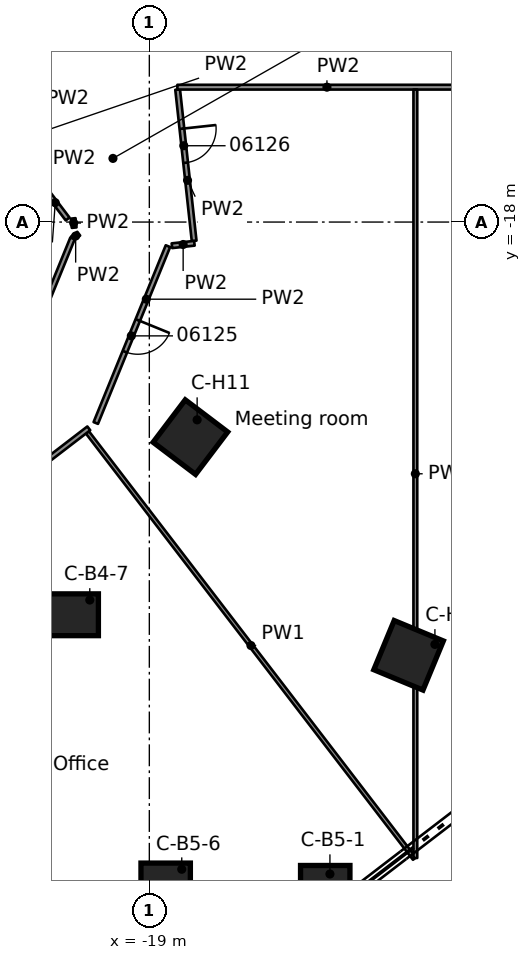
"""IFC4 building model, lengths in metres.
Left out: names, types, materials, properties, quantities, classifications, styles, units other than length and angle.
Written with IfcOpenShell. Run it as: python <this file> out.ifc"""

import sys

from ifc_helpers import new_model, si_unit, direction, frame, frame_2d, origin, origin_2d, place, context, subcontext, project, spatial, rectangle, extrude, element, fill, save


model = new_model("IFC4")
c1 = context("Model", 3, precision=1e-05, world=origin(), true_north=direction((0.0, 1.0)))
c2 = subcontext(c1, "Body", "Model", "MODEL_VIEW")
j1 = project(units=[si_unit("LENGTHUNIT", "METRE"), si_unit("PLANEANGLEUNIT", "RADIAN")], contexts=[c1])
p1 = place(None, origin())
s1 = spatial("IfcSite", under=j1, at=p1, CompositionType="ELEMENT")
p2 = place(p1, origin())
s2 = spatial("IfcBuilding", under=s1, at=p2, CompositionType="ELEMENT")
p3 = place(p2, frame((0.0, 0.0, 29.2)))
s3 = spatial("IfcBuildingStorey", under=s2, at=p3, CompositionType="ELEMENT", Elevation=29.2)
for number, where, z_axis, x_axis in (
    (1, (-20.99, -28.333, 0.0), (0.0, 0.0, 1.0), (1.0, 0.0, 0.0)),
    (2, (-14.371, -35.48, 0.0), (0.0, 0.0, 1.0), (1.0, 0.0, 0.0)),
    (3, (-18.57, -35.417, 0.0), (0.0, 0.0, 1.0), (1.0, 0.0, 0.0)),
):
    element("IfcColumn", number, at=place(p3, frame(where, z_axis=z_axis, x_axis=x_axis)), inside=s3, PredefinedType="COLUMN", context=c2, shape_type="SweptSolid", body=[
        extrude(rectangle(XDim=1.3, YDim=1.1, at=origin_2d()), origin(), (0.0, 0.0, 1.0), 4.1),
    ])
for number, where, z_axis, x_axis in (
    (4, (-12.178, -29.4, 0.0), (0.0, 0.0, 1.0), (-0.383, -0.924, 0.0)),
    (5, (-17.919, -23.659, 0.0), (0.0, 0.0, 1.0), (-0.604, -0.797, 0.0)),
):
    element("IfcColumn", number, at=place(p3, frame(where, z_axis=z_axis, x_axis=x_axis)), inside=s3, PredefinedType="COLUMN", context=c2, shape_type="SweptSolid", body=[
        extrude(rectangle(XDim=1.4, YDim=1.4, at=origin_2d()), origin(), (0.0, 0.0, 1.0), 4.1),
    ])
p4 = place(p3, frame((-21.004, -17.904, 0.0), z_axis=(0.0, 0.0, 1.0), x_axis=(0.105933230141, -0.994373245191, 0.0)))
e6 = element("IfcWall", 6, at=p4, inside=s3, PredefinedType="PARTITIONING", context=c2, shape_type="SweptSolid", body=[
    extrude(rectangle(XDim=0.244, YDim=0.125, at=frame_2d((0.122, 0.0))), origin(), (0.0, 0.0, 1.0), 3.66),
])
p5 = place(p3, frame((-18.255, -14.513, 0.0), z_axis=(0.0, 0.0, 1.0), x_axis=(0.108304050005, -0.994117816334, 0.0)))
e7 = element("IfcWall", 7, at=p5, inside=s3, PredefinedType="PARTITIONING", context=c2, shape_type="SweptSolid", body=[
    extrude(rectangle(XDim=4.006, YDim=0.125, at=frame_2d((2.003, 0.0))), origin(), (0.0, 0.0, 1.0), 3.66),
])
p6 = place(p5, frame((1.038, 0.0, 0.0)))
e8 = element("IfcOpeningElement", 8, at=p6, cuts=e7, PredefinedType="OPENING", context=c2, shape_type="SweptSolid", body=[
    extrude(rectangle(XDim=0.9, YDim=2.1, at=frame_2d((0.45, 1.05))), frame((0.0, 0.073, 0.0), z_axis=(0.0, -1.0, 0.0), x_axis=(1.0, 0.0, 0.0)), (0.0, 0.0, 1.0), 0.145),
])
p7 = place(p3, frame((-21.801, -17.061, 0.0), z_axis=(0.0, 0.0, 1.0), x_axis=(0.604123687543, -0.796890563471, 0.0)))
e9 = element("IfcWall", 9, at=p7, inside=s3, PredefinedType="PARTITIONING", context=c2, shape_type="SweptSolid", body=[
    extrude(rectangle(XDim=1.078, YDim=0.125, at=frame_2d((0.539, 0.0))), origin(), (0.0, 0.0, 1.0), 3.66),
])
p8 = place(p3, frame((-29.282, -30.176, 0.0), z_axis=(0.0, 0.0, 1.0), x_axis=(0.608773787241, -0.793343857333, 0.0)))
e10 = element("IfcWall", 10, at=p8, inside=s3, PredefinedType="PARTITIONING", context=c2, shape_type="SweptSolid", body=[
    extrude(rectangle(XDim=14.135, YDim=0.1, at=frame_2d((7.067, 0.0))), origin(), (0.0, 0.0, 1.0), 3.025),
])
p9 = place(p3, frame((-20.629, -23.535, 0.0), z_axis=(0.0, 0.0, 1.0), x_axis=(0.608775561638, -0.793342495743, 0.0)))
e11 = element("IfcWall", 11, at=p9, inside=s3, PredefinedType="PARTITIONING", context=c2, shape_type="SweptSolid", body=[
    extrude(rectangle(XDim=14.136, YDim=0.1, at=frame_2d((7.068, 0.0))), origin(), (0.0, 0.0, 1.0), 3.66),
])
p10 = place(p3, frame((-18.262, -14.451, 0.0), z_axis=(0.0, 0.0, 1.0), x_axis=(1.0, 0.0, 0.0)))
e12 = element("IfcWall", 12, at=p10, inside=s3, PredefinedType="PARTITIONING", context=c2, shape_type="SweptSolid", body=[
    extrude(rectangle(XDim=7.871, YDim=0.125, at=frame_2d((3.936, 0.0))), origin(), (0.0, 0.0, 1.0), 3.66),
])
p11 = place(p3, frame((-18.406, -18.623, 0.0), z_axis=(0.0, 0.0, 1.0), x_axis=(0.994037722998, 0.109036715182, 0.0)))
e13 = element("IfcWall", 13, at=p11, inside=s3, PredefinedType="PARTITIONING", context=c2, shape_type="SweptSolid", body=[
    extrude(rectangle(XDim=0.596, YDim=0.125, at=frame_2d((0.298, 0.0))), origin(), (0.0, 0.0, 1.0), 3.66),
])
p12 = place(p3, frame((-21.019, -18.428, 0.0), z_axis=(0.0, 0.0, 1.0), x_axis=(0.797092148154, 0.603857687995, 0.0)))
e14 = element("IfcWall", 14, at=p12, inside=s3, PredefinedType="PARTITIONING", context=c2, shape_type="SweptSolid", body=[
    extrude(rectangle(XDim=0.202, YDim=0.125, at=frame_2d((0.101, 0.0))), origin(), (0.0, 0.0, 1.0), 3.66),
])
p13 = place(p3, frame((-20.593, -23.428, 0.0), z_axis=(0.0, 0.0, 1.0), x_axis=(-0.793332393454, -0.608788726486, 0.0)))
e15 = element("IfcWall", 15, at=p13, inside=s3, PredefinedType="PARTITIONING", context=c2, shape_type="SweptSolid", body=[
    extrude(rectangle(XDim=9.986, YDim=0.125, at=frame_2d((4.993, 0.0))), origin(), (0.0, 0.0, 1.0), 3.66),
])
p14 = place(p13, frame((2.445, 0.0, 0.0)))
e16 = element("IfcOpeningElement", 16, at=p14, cuts=e15, PredefinedType="OPENING", context=c2, shape_type="SweptSolid", body=[
    extrude(rectangle(XDim=0.9, YDim=2.1, at=frame_2d((0.45, 1.05))), frame((0.0, 0.073, 0.0), z_axis=(0.0, -1.0, 0.0), x_axis=(1.0, 0.0, 0.0)), (0.0, 0.0, 1.0), 0.145),
])
p15 = place(p3, frame((-18.51, -18.634, 0.0), z_axis=(0.0, 0.0, 1.0), x_axis=(-0.377847706778, -0.925867760797, 0.0)))
e17 = element("IfcWall", 17, at=p15, inside=s3, PredefinedType="PARTITIONING", context=c2, shape_type="SweptSolid", body=[
    extrude(rectangle(XDim=5.026, YDim=0.125, at=frame_2d((2.513, 0.0))), origin(), (0.0, 0.0, 1.0), 3.66),
])
p16 = place(p15, frame((2.1, 0.0, 0.0)))
e18 = element("IfcOpeningElement", 18, at=p16, cuts=e17, PredefinedType="OPENING", context=c2, shape_type="SweptSolid", body=[
    extrude(rectangle(XDim=0.9, YDim=2.1, at=frame_2d((0.45, 1.05))), frame((0.0, 0.073, 0.0), z_axis=(0.0, -1.0, 0.0), x_axis=(1.0, 0.0, 0.0)), (0.0, 0.0, 1.0), 0.145),
])
p17 = place(p3, frame((-22.387, -21.778, 0.0), z_axis=(0.0, 0.0, 1.0), x_axis=(0.377843834017, 0.925869341265, 0.0)))
e19 = element("IfcWall", 19, at=p17, inside=s3, PredefinedType="PARTITIONING", context=c2, shape_type="SweptSolid", body=[
    extrude(rectangle(XDim=3.615, YDim=0.125, at=frame_2d((1.808, 0.0))), origin(), (0.0, 0.0, 1.0), 3.66),
])
p18 = place(p3, frame((-12.0, -34.733, 0.0), z_axis=(0.0, 0.0, 1.0), x_axis=(0.0, 1.0, 0.0)))
e20 = element("IfcWall", 20, at=p18, inside=s3, PredefinedType="PARTITIONING", context=c2, shape_type="SweptSolid", body=[
    extrude(rectangle(XDim=20.219, YDim=0.1, at=frame_2d((10.109, 0.0))), origin(), (0.0, 0.0, 1.0), 3.025),
])
p19 = place(p16, origin())
e21 = element("IfcDoor", 21, at=p19, inside=s3, OperationType="SINGLE_SWING_RIGHT", PredefinedType="DOOR", context=c2, shape_type="SweptSolid", body=[
    extrude(rectangle(XDim=0.9, YDim=2.1, at=frame_2d((0.45, 1.05))), frame((0.0, 0.025, 0.0), z_axis=(0.0, -1.0, 0.0), x_axis=(1.0, 0.0, 0.0)), (0.0, 0.0, 1.0), 0.05),
])
fill(e18, e21)
p20 = place(p6, origin())
e22 = element("IfcDoor", 22, at=p20, inside=s3, OperationType="SINGLE_SWING_LEFT", PredefinedType="DOOR", context=c2, shape_type="SweptSolid", body=[
    extrude(rectangle(XDim=0.9, YDim=2.1, at=frame_2d((0.45, 1.05))), frame((0.0, 0.025, 0.0), z_axis=(0.0, -1.0, 0.0), x_axis=(1.0, 0.0, 0.0)), (0.0, 0.0, 1.0), 0.05),
])
fill(e8, e22)
save(model, sys.argv[1])
